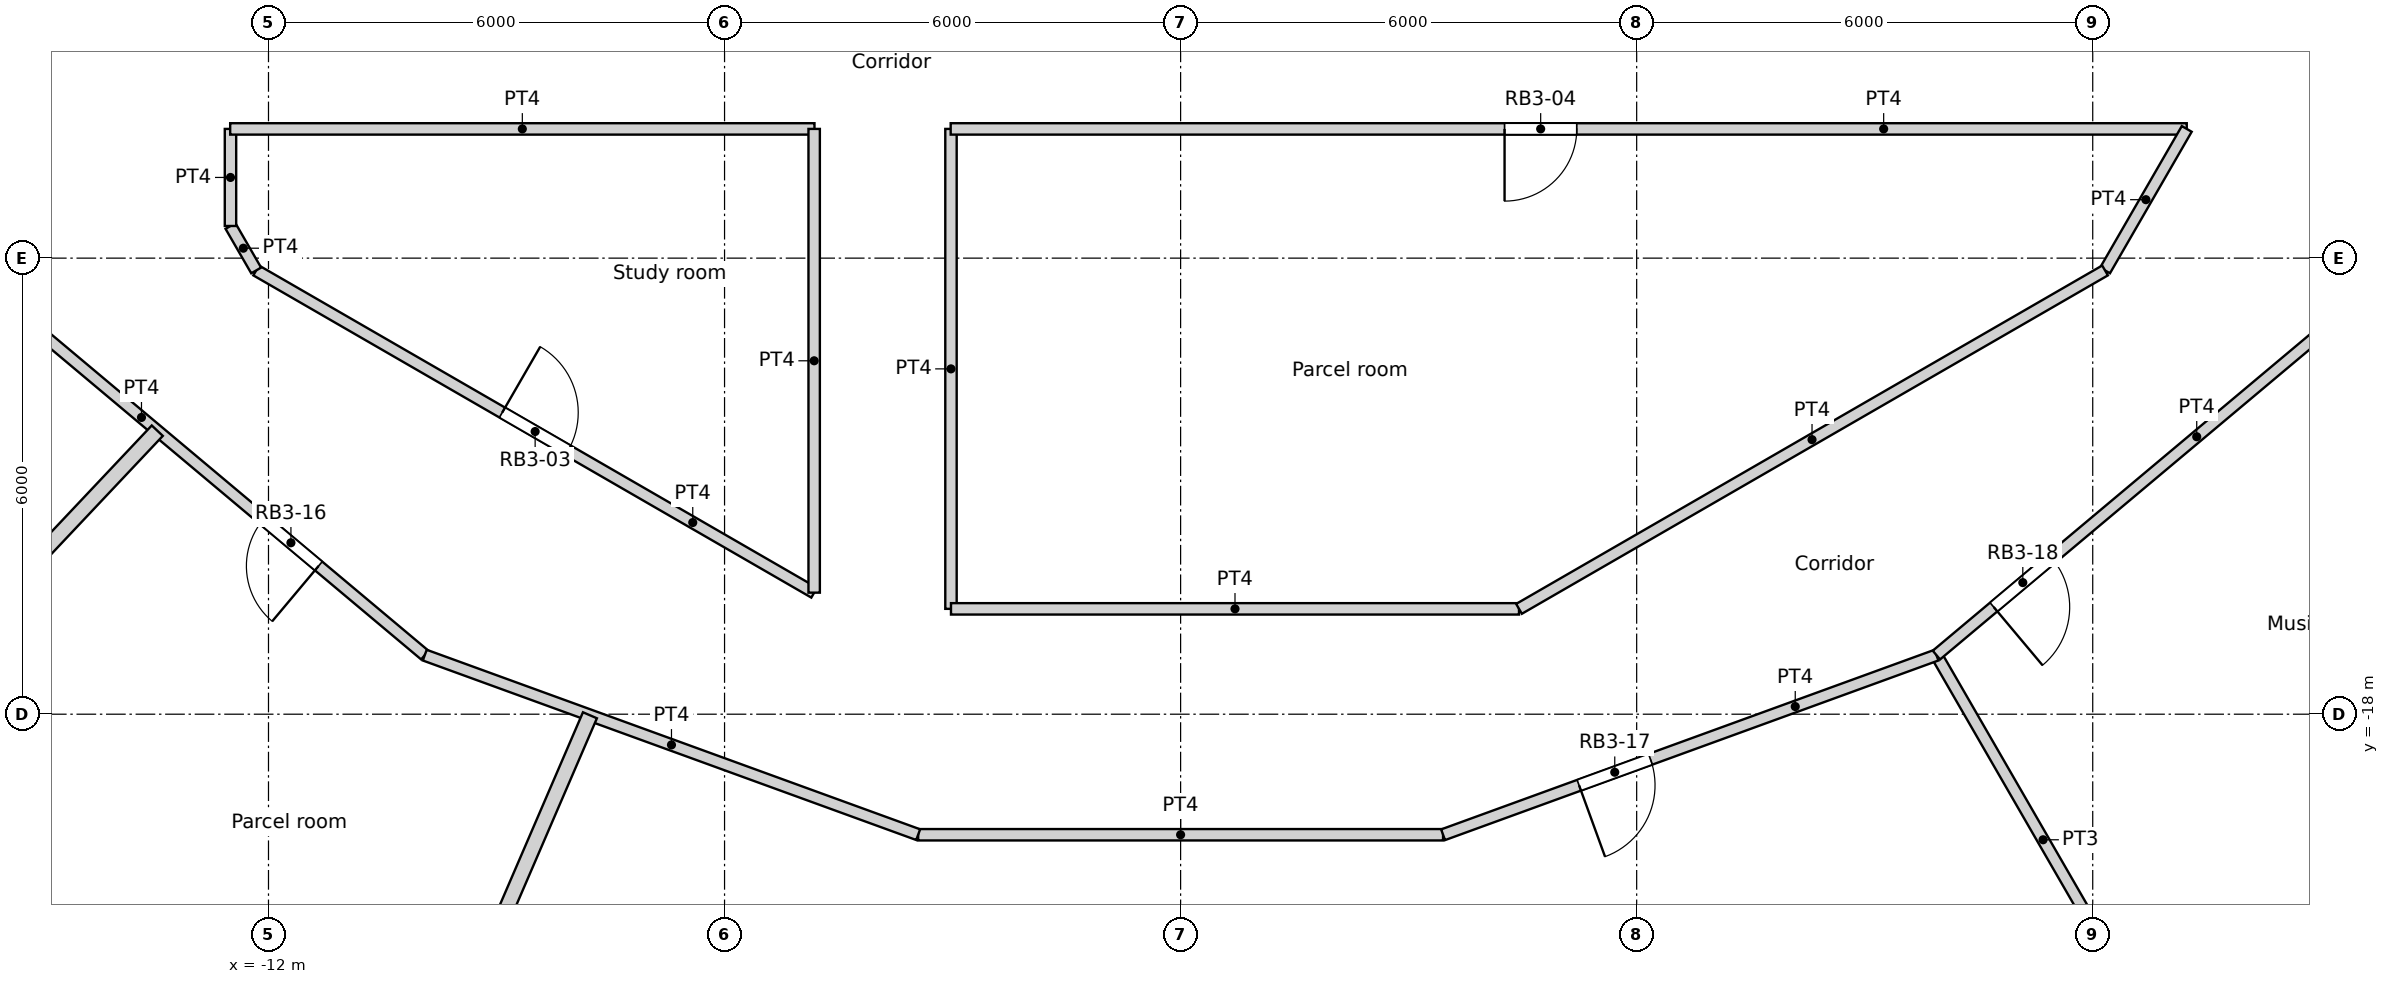
"""IFC4 building model, lengths in metres.
Left out: names, types, materials, properties, quantities, classifications, styles, units other than length and angle.
Written with IfcOpenShell. Run it as: python <this file> out.ifc"""

import sys

from ifc_helpers import new_model, si_unit, direction, frame, frame_2d, origin, origin_2d, place, context, subcontext, project, spatial, rectangle, circle, extrude, element, fill, save


model = new_model("IFC4")
c1 = context("Model", 3, precision=1e-05, world=origin(), true_north=direction((0.0, 1.0)))
c2 = subcontext(c1, "Body", "Model", "MODEL_VIEW")
j1 = project(units=[si_unit("LENGTHUNIT", "METRE"), si_unit("PLANEANGLEUNIT", "RADIAN")], contexts=[c1])
p1 = place(None, origin())
s1 = spatial("IfcSite", under=j1, at=p1, CompositionType="ELEMENT")
p2 = place(p1, origin())
s2 = spatial("IfcBuilding", under=s1, at=p2, CompositionType="ELEMENT")
p3 = place(p2, frame((0.0, 0.0, 147.6)))
s3 = spatial("IfcBuildingStorey", under=s2, at=p3, CompositionType="ELEMENT", Elevation=147.6)
p4 = place(p3, frame((14.659, -19.69, 0.0), z_axis=(0.0, 0.0, 1.0), x_axis=(1.0, 0.0, 0.0)))
e1 = element("IfcColumn", 1, at=p4, inside=s3, PredefinedType="COLUMN", context=c2, shape_type="SweptSolid", body=[
    extrude(circle(Radius=0.6, at=origin_2d()), origin(), (0.0, 0.0, 1.0), 3.6),
])
for number, where, z_axis, x_axis in (
    (2, (-13.798, -12.802, 0.0), (0.0, 0.0, 1.0), (1.0, 0.0, 0.0)),
    (3, (-9.411, -16.301, 0.0), (0.0, 0.0, 1.0), (1.0, 0.0, 0.0)),
    (4, (-4.188, -18.35, 0.0), (0.0, 0.0, 1.0), (1.0, 0.0, 0.0)),
    (5, (1.406, -18.77, 0.0), (0.0, 0.0, 1.0), (1.0, 0.0, 0.0)),
    (6, (6.876, -17.521, 0.0), (0.0, 0.0, 1.0), (1.0, 0.0, 0.0)),
    (7, (11.735, -14.716, 0.0), (0.0, 0.0, 1.0), (1.0, 0.0, 0.0)),
):
    element("IfcColumn", number, at=place(p3, frame(where, z_axis=z_axis, x_axis=x_axis)), inside=s3, PredefinedType="COLUMN", context=c2, shape_type="SweptSolid", body=[
        extrude(circle(Radius=0.65, at=origin_2d()), origin(), (0.0, 0.0, 1.0), 3.6),
    ])
p5 = place(p3, frame((-15.316, -20.573, 0.0), z_axis=(0.0, 0.0, 1.0), x_axis=(0.835508361394, -0.54947773207, 0.0)))
e8 = element("IfcWall", 8, at=p5, inside=s3, PredefinedType="SOLIDWALL", context=c2, shape_type="SweptSolid", body=[
    extrude(rectangle(XDim=2.973, YDim=0.3, at=frame_2d((1.486, 0.0))), origin(), (0.0, 0.0, 1.0), 3.3),
])
p6 = place(p5, frame((1.486, 0.0, 1.55)))
e9 = element("IfcOpeningElement", 9, at=p6, cuts=e8, PredefinedType="OPENING", context=c2, shape_type="SweptSolid", body=[
    extrude(circle(Radius=0.9, at=origin_2d()), frame((0.0, 0.16, 0.0), z_axis=(0.0, -1.0, 0.0), x_axis=(1.0, 0.0, 0.0)), (0.0, 0.0, 1.0), 0.32),
])
p7 = place(p3, frame((13.132, -22.697, -0.3), z_axis=(0.0, 0.0, 1.0), x_axis=(0.835514416706, 0.549468524554, 0.0)))
e10 = element("IfcWall", 10, at=p7, inside=s3, PredefinedType="ELEMENTEDWALL", context=c2, shape_type="SweptSolid", body=[
    extrude(rectangle(XDim=3.0, YDim=1.45, at=frame_2d((1.5, 0.0))), origin(), (0.0, 0.0, 1.0), 3.6),
])
p8 = place(p7, frame((1.5, 0.0, 1.85)))
e11 = element("IfcOpeningElement", 11, at=p8, cuts=e10, PredefinedType="OPENING", context=c2, shape_type="SweptSolid", body=[
    extrude(circle(Radius=0.9, at=origin_2d()), frame((0.0, 0.735, 0.0), z_axis=(0.0, -1.0, 0.0), x_axis=(1.0, 0.0, 0.0)), (0.0, 0.0, 1.0), 1.47),
])
p9 = place(p3, frame((-12.504, -10.3, 0.0), z_axis=(0.0, 0.0, 1.0), x_axis=(1.0, 0.0, 0.0)))
e12 = element("IfcWall", 12, at=p9, inside=s3, PredefinedType="PARTITIONING", context=c2, shape_type="SweptSolid", body=[
    extrude(rectangle(XDim=7.687, YDim=0.15, at=frame_2d((3.844, 0.0))), origin(), (0.0, 0.0, 1.0), 3.3),
])
p10 = place(p3, frame((-3.025, -10.3, 0.0), z_axis=(0.0, 0.0, 1.0), x_axis=(1.0, 0.0, 0.0)))
e13 = element("IfcWall", 13, at=p10, inside=s3, PredefinedType="PARTITIONING", context=c2, shape_type="SweptSolid", body=[
    extrude(rectangle(XDim=16.262, YDim=0.15, at=frame_2d((8.131, 0.0))), origin(), (0.0, 0.0, 1.0), 3.3),
])
p11 = place(p10, frame((7.287, 0.0, 0.0)))
e14 = element("IfcOpeningElement", 14, at=p11, cuts=e13, PredefinedType="OPENING", context=c2, shape_type="SweptSolid", body=[
    extrude(rectangle(XDim=0.95, YDim=2.1, at=frame_2d((0.475, 1.05))), frame((0.0, 0.075, 0.0), z_axis=(0.0, -1.0, 0.0), x_axis=(1.0, 0.0, 0.0)), (0.0, 0.0, 1.0), 0.15),
])
p12 = place(p3, frame((12.162, -12.162, 0.0), z_axis=(0.0, 0.0, 1.0), x_axis=(0.499961633463, 0.866047553582, 0.0)))
e15 = element("IfcWall", 15, at=p12, inside=s3, PredefinedType="PARTITIONING", context=c2, shape_type="SweptSolid", body=[
    extrude(rectangle(XDim=2.15, YDim=0.15, at=frame_2d((1.075, 0.0))), origin(), (0.0, 0.0, 1.0), 3.3),
])
p13 = place(p3, frame((9.943, -17.222, 0.0), z_axis=(0.0, 0.0, 1.0), x_axis=(0.766192104565, 0.642611592567, 0.0)))
e16 = element("IfcWall", 16, at=p13, inside=s3, PredefinedType="PARTITIONING", context=c2, shape_type="SweptSolid", body=[
    extrude(rectangle(XDim=6.906, YDim=0.15, at=frame_2d((3.453, 0.0))), origin(), (0.0, 0.0, 1.0), 3.3),
])
p14 = place(p13, frame((0.984, 0.0, 0.0)))
e17 = element("IfcOpeningElement", 17, at=p14, cuts=e16, PredefinedType="OPENING", context=c2, shape_type="SweptSolid", body=[
    extrude(rectangle(XDim=1.0, YDim=2.04, at=frame_2d((0.5, 1.02))), frame((0.0, 0.075, 0.0), z_axis=(0.0, -1.0, 0.0), x_axis=(1.0, 0.0, 0.0)), (0.0, 0.0, 1.0), 0.15),
])
p15 = place(p3, frame((-12.5, -11.577, 0.0), z_axis=(0.0, 0.0, 1.0), x_axis=(0.0, 1.0, 0.0)))
e18 = element("IfcWall", 18, at=p15, inside=s3, PredefinedType="PARTITIONING", context=c2, shape_type="SweptSolid", body=[
    extrude(rectangle(XDim=1.277, YDim=0.15, at=frame_2d((0.638, 0.0))), origin(), (0.0, 0.0, 1.0), 3.3),
])
p16 = place(p3, frame((-12.5, -11.577, 0.0), z_axis=(0.0, 0.0, 1.0), x_axis=(0.500024767483, -0.866011103799, 0.0)))
e19 = element("IfcWall", 19, at=p16, inside=s3, PredefinedType="PARTITIONING", context=c2, shape_type="SweptSolid", body=[
    extrude(rectangle(XDim=0.676, YDim=0.15, at=frame_2d((0.338, 0.0))), origin(), (0.0, 0.0, 1.0), 3.3),
])
p17 = place(p3, frame((-15.235, -12.784, 0.0), z_axis=(0.0, 0.0, 1.0), x_axis=(0.766192104565, -0.642611592567, 0.0)))
e20 = element("IfcWall", 20, at=p17, inside=s3, PredefinedType="PARTITIONING", context=c2, shape_type="SweptSolid", body=[
    extrude(rectangle(XDim=6.906, YDim=0.15, at=frame_2d((3.453, 0.0))), origin(), (0.0, 0.0, 1.0), 3.3),
])
p18 = place(p17, frame((4.133, 0.0, 0.0)))
e21 = element("IfcOpeningElement", 21, at=p18, cuts=e20, PredefinedType="OPENING", context=c2, shape_type="SweptSolid", body=[
    extrude(rectangle(XDim=0.95, YDim=2.1, at=frame_2d((0.475, 1.05))), frame((0.0, 0.075, 0.0), z_axis=(0.0, -1.0, 0.0), x_axis=(1.0, 0.0, 0.0)), (0.0, 0.0, 1.0), 0.15),
])
p19 = place(p3, frame((-12.162, -12.162, 0.0), z_axis=(0.0, 0.0, 1.0), x_axis=(0.866004766557, -0.500035743023, 0.0)))
e22 = element("IfcWall", 22, at=p19, inside=s3, PredefinedType="PARTITIONING", context=c2, shape_type="SweptSolid", body=[
    extrude(rectangle(XDim=8.477, YDim=0.15, at=frame_2d((4.239, 0.0))), origin(), (0.0, 0.0, 1.0), 3.3),
])
p20 = place(p19, frame((3.738, 0.0, 0.0)))
e23 = element("IfcOpeningElement", 23, at=p20, cuts=e22, PredefinedType="OPENING", context=c2, shape_type="SweptSolid", body=[
    extrude(rectangle(XDim=1.0, YDim=2.04, at=frame_2d((0.5, 1.02))), frame((0.0, 0.075, 0.0), z_axis=(0.0, -1.0, 0.0), x_axis=(1.0, 0.0, 0.0)), (0.0, 0.0, 1.0), 0.15),
])
p21 = place(p3, frame((-4.821, -16.401, 0.0), z_axis=(0.0, 0.0, 1.0), x_axis=(0.0, 1.0, 0.0)))
e24 = element("IfcWall", 24, at=p21, inside=s3, PredefinedType="PARTITIONING", context=c2, shape_type="SweptSolid", body=[
    extrude(rectangle(XDim=6.101, YDim=0.15, at=frame_2d((3.05, 0.0))), origin(), (0.0, 0.0, 1.0), 3.3),
])
p22 = place(p3, frame((-3.021, -16.614, 0.0), z_axis=(0.0, 0.0, 1.0), x_axis=(0.0, 1.0, 0.0)))
e25 = element("IfcWall", 25, at=p22, inside=s3, PredefinedType="PARTITIONING", context=c2, shape_type="SweptSolid", body=[
    extrude(rectangle(XDim=6.314, YDim=0.15, at=frame_2d((3.157, 0.0))), origin(), (0.0, 0.0, 1.0), 3.3),
])
p23 = place(p3, frame((-3.021, -16.614, 0.0), z_axis=(0.0, 0.0, 1.0), x_axis=(1.0, 0.0, 0.0)))
e26 = element("IfcWall", 26, at=p23, inside=s3, PredefinedType="PARTITIONING", context=c2, shape_type="SweptSolid", body=[
    extrude(rectangle(XDim=7.473, YDim=0.15, at=frame_2d((3.736, 0.0))), origin(), (0.0, 0.0, 1.0), 3.3),
])
p24 = place(p3, frame((4.452, -16.614, 0.0), z_axis=(0.0, 0.0, 1.0), x_axis=(0.866005203721, 0.500034985904, 0.0)))
e27 = element("IfcWall", 27, at=p24, inside=s3, PredefinedType="PARTITIONING", context=c2, shape_type="SweptSolid", body=[
    extrude(rectangle(XDim=8.903, YDim=0.15, at=frame_2d((4.452, 0.0))), origin(), (0.0, 0.0, 1.0), 3.3),
])
p25 = place(p3, frame((-9.944, -17.223, 0.0), z_axis=(0.0, 0.0, 1.0), x_axis=(0.939737689664, -0.341896292208, 0.0)))
e28 = element("IfcWall", 28, at=p25, inside=s3, PredefinedType="PARTITIONING", context=c2, shape_type="SweptSolid", body=[
    extrude(rectangle(XDim=6.908, YDim=0.15, at=frame_2d((3.454, 0.0))), origin(), (0.0, 0.0, 1.0), 3.3),
])
p26 = place(p3, frame((3.453, -19.586, 0.0), z_axis=(0.0, 0.0, 1.0), x_axis=(0.939672634566, 0.342075050021, 0.0)))
e29 = element("IfcWall", 29, at=p26, inside=s3, PredefinedType="PARTITIONING", context=c2, shape_type="SweptSolid", body=[
    extrude(rectangle(XDim=6.908, YDim=0.15, at=frame_2d((3.454, 0.0))), origin(), (0.0, 0.0, 1.0), 3.3),
])
p27 = place(p26, frame((1.904, 0.0, 0.0)))
e30 = element("IfcOpeningElement", 30, at=p27, cuts=e29, PredefinedType="OPENING", context=c2, shape_type="SweptSolid", body=[
    extrude(rectangle(XDim=1.0, YDim=2.04, at=frame_2d((0.5, 1.02))), frame((0.0, 0.075, 0.0), z_axis=(0.0, -1.0, 0.0), x_axis=(1.0, 0.0, 0.0)), (0.0, 0.0, 1.0), 0.15),
])
p28 = place(p3, frame((-3.453, -19.586, 0.0), z_axis=(0.0, 0.0, 1.0), x_axis=(1.0, 0.0, 0.0)))
e31 = element("IfcWall", 31, at=p28, inside=s3, PredefinedType="PARTITIONING", context=c2, shape_type="SweptSolid", body=[
    extrude(rectangle(XDim=6.906, YDim=0.15, at=frame_2d((3.453, 0.0))), origin(), (0.0, 0.0, 1.0), 3.3),
])
p29 = place(p3, frame((-17.497, -18.546, 0.0), z_axis=(0.0, 0.0, 1.0), x_axis=(0.6862502776, 0.72736549031, 0.0)))
e32 = element("IfcWall", 32, at=p29, inside=s3, PredefinedType="PARTITIONING", context=c2, shape_type="SweptSolid", body=[
    extrude(rectangle(XDim=5.879, YDim=0.2, at=frame_2d((2.939, 0.0))), origin(), (0.0, 0.0, 1.0), 3.3),
])
p30 = place(p3, frame((-10.099, -23.412, 0.0), z_axis=(0.0, 0.0, 1.0), x_axis=(0.39601833725, 0.918242602236, 0.0)))
e33 = element("IfcWall", 33, at=p30, inside=s3, PredefinedType="PARTITIONING", context=c2, shape_type="SweptSolid", body=[
    extrude(rectangle(XDim=5.879, YDim=0.2, at=frame_2d((2.939, 0.0))), origin(), (0.0, 0.0, 1.0), 3.3),
])
p31 = place(p3, frame((9.944, -17.223, 0.0), z_axis=(0.0, 0.0, 1.0), x_axis=(0.500010020406, -0.866019618423, 0.0)))
e34 = element("IfcWall", 34, at=p31, inside=s3, PredefinedType="PARTITIONING", context=c2, shape_type="SweptSolid", body=[
    extrude(rectangle(XDim=5.61, YDim=0.15, at=frame_2d((2.805, 0.0))), origin(), (0.0, 0.0, 1.0), 3.3),
])
p32 = place(p20, origin())
e35 = element("IfcDoor", 35, at=p32, inside=s3, OperationType="SINGLE_SWING_LEFT", PredefinedType="DOOR", context=c2, shape_type="SweptSolid", body=[
    extrude(rectangle(XDim=1.0, YDim=2.04, at=frame_2d((0.5, 1.02))), frame((0.0, 0.025, 0.0), z_axis=(0.0, -1.0, 0.0), x_axis=(1.0, 0.0, 0.0)), (0.0, 0.0, 1.0), 0.05),
])
fill(e23, e35)
p33 = place(p11, origin())
e36 = element("IfcDoor", 36, at=p33, inside=s3, OperationType="SINGLE_SWING_RIGHT", PredefinedType="DOOR", context=c2, shape_type="SweptSolid", body=[
    extrude(rectangle(XDim=0.95, YDim=2.1, at=frame_2d((0.475, 1.05))), frame((0.0, 0.025, 0.0), z_axis=(0.0, -1.0, 0.0), x_axis=(1.0, 0.0, 0.0)), (0.0, 0.0, 1.0), 0.05),
])
fill(e14, e36)
p34 = place(p18, origin())
e37 = element("IfcDoor", 37, at=p34, inside=s3, OperationType="SINGLE_SWING_LEFT", PredefinedType="DOOR", context=c2, shape_type="SweptSolid", body=[
    extrude(rectangle(XDim=0.95, YDim=2.1, at=frame_2d((0.475, 1.05))), frame((0.0, 0.025, 0.0), z_axis=(0.0, -1.0, 0.0), x_axis=(1.0, 0.0, 0.0)), (0.0, 0.0, 1.0), 0.05),
])
fill(e21, e37)
p35 = place(p27, origin())
e38 = element("IfcDoor", 38, at=p35, inside=s3, OperationType="SINGLE_SWING_RIGHT", PredefinedType="DOOR", context=c2, shape_type="SweptSolid", body=[
    extrude(rectangle(XDim=1.0, YDim=2.04, at=frame_2d((0.5, 1.02))), frame((0.0, 0.025, 0.0), z_axis=(0.0, -1.0, 0.0), x_axis=(1.0, 0.0, 0.0)), (0.0, 0.0, 1.0), 0.05),
])
fill(e30, e38)
p36 = place(p14, origin())
e39 = element("IfcDoor", 39, at=p36, inside=s3, OperationType="SINGLE_SWING_RIGHT", PredefinedType="DOOR", context=c2, shape_type="SweptSolid", body=[
    extrude(rectangle(XDim=1.0, YDim=2.04, at=frame_2d((0.5, 1.02))), frame((0.0, 0.025, 0.0), z_axis=(0.0, -1.0, 0.0), x_axis=(1.0, 0.0, 0.0)), (0.0, 0.0, 1.0), 0.05),
])
fill(e17, e39)
save(model, sys.argv[1])
